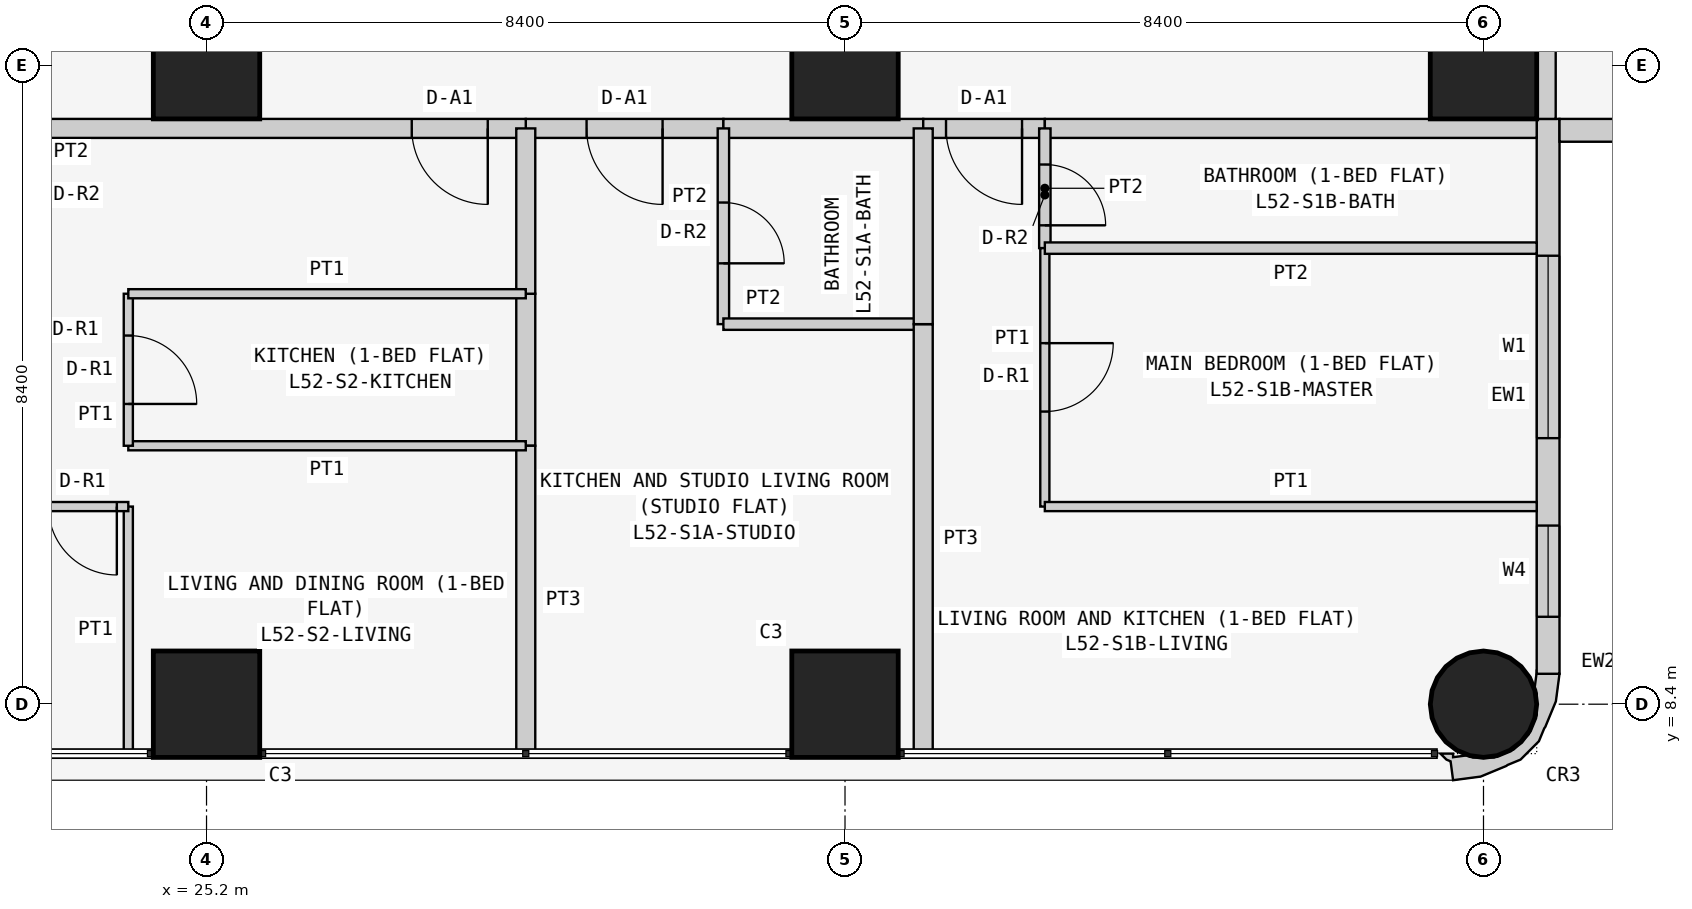
"""IFC4 building model, lengths in metres.
Left out: names, types, materials, properties, quantities, classifications, styles, units other than length and angle.
Written with IfcOpenShell. Run it as: python <this file> out.ifc"""

import sys

from ifc_helpers import new_model, si_unit, direction, frame, frame_2d, origin, origin_2d, place, context, subcontext, project, spatial, polyline, rectangle, circle, outline, extrude, element, fill, save


model = new_model("IFC4")
c1 = context("Model", 3, precision=1e-05, world=origin(), true_north=direction((0.0, 1.0)))
c2 = subcontext(c1, "Body", "Model", "MODEL_VIEW")
j1 = project(units=[si_unit("LENGTHUNIT", "METRE"), si_unit("PLANEANGLEUNIT", "RADIAN")], contexts=[c1])
p1 = place(None, origin())
s1 = spatial("IfcSite", under=j1, at=p1, CompositionType="ELEMENT")
p2 = place(p1, origin())
s2 = spatial("IfcBuilding", under=s1, at=p2, CompositionType="ELEMENT")
p3 = place(p2, frame((0.0, 0.0, 201.3)))
s3 = spatial("IfcBuildingStorey", under=s2, at=p3, CompositionType="ELEMENT", Elevation=201.3)
for number, where, z_axis, x_axis in (
    (1, (25.2, 8.4, 0.0), (0.0, 0.0, 1.0), (1.0, 0.0, 0.0)),
    (2, (25.2, 16.8, 0.0), (0.0, 0.0, 1.0), (1.0, 0.0, 0.0)),
    (3, (33.6, 8.4, 0.0), (0.0, 0.0, 1.0), (1.0, 0.0, 0.0)),
    (4, (33.6, 16.8, 0.0), (0.0, 0.0, 1.0), (1.0, 0.0, 0.0)),
):
    element("IfcColumn", number, at=place(p3, frame(where, z_axis=z_axis, x_axis=x_axis)), inside=s3, PredefinedType="COLUMN", context=c2, shape_type="SweptSolid", body=[
        extrude(rectangle(XDim=1.4, YDim=1.4, at=origin_2d()), origin(), (0.0, 0.0, 1.0), 3.6),
    ])
p4 = place(p3, frame((42.0, 8.4, 0.0), z_axis=(0.0, 0.0, 1.0), x_axis=(1.0, 0.0, 0.0)))
e5 = element("IfcColumn", 5, at=p4, inside=s3, PredefinedType="COLUMN", context=c2, shape_type="SweptSolid", body=[
    extrude(circle(Radius=0.7, at=origin_2d()), origin(), (0.0, 0.0, 1.0), 3.6),
])
p5 = place(p3, frame((42.0, 16.8, 0.0), z_axis=(0.0, 0.0, 1.0), x_axis=(1.0, 0.0, 0.0)))
e6 = element("IfcColumn", 6, at=p5, inside=s3, PredefinedType="COLUMN", context=c2, shape_type="SweptSolid", body=[
    extrude(rectangle(XDim=1.4, YDim=1.4, at=origin_2d()), origin(), (0.0, 0.0, 1.0), 3.6),
])
p6 = place(p3, frame((42.85, 8.8, 0.0), z_axis=(0.0, 0.0, 1.0), x_axis=(0.0, 1.0, 0.0)))
e7 = element("IfcWall", 7, at=p6, inside=s3, PredefinedType="SOLIDWALL", context=c2, shape_type="SweptSolid", body=[
    extrude(rectangle(XDim=7.3, YDim=0.3, at=frame_2d((3.65, 0.0))), origin(), (0.0, 0.0, 1.0), 3.45),
])
p7 = place(p6, frame((3.1, 0.0, 0.9)))
e8 = element("IfcOpeningElement", 8, at=p7, cuts=e7, PredefinedType="OPENING", context=c2, shape_type="SweptSolid", body=[
    extrude(rectangle(XDim=2.4, YDim=1.5, at=frame_2d((1.2, 0.75))), frame((0.0, 0.16, 0.0), z_axis=(0.0, -1.0, 0.0), x_axis=(1.0, 0.0, 0.0)), (0.0, 0.0, 1.0), 0.32),
])
p8 = place(p6, frame((0.75, 0.0, 0.9)))
e9 = element("IfcOpeningElement", 9, at=p8, cuts=e7, PredefinedType="OPENING", context=c2, shape_type="SweptSolid", body=[
    extrude(rectangle(XDim=1.2, YDim=1.5, at=frame_2d((0.6, 0.75))), frame((0.0, 0.16, 0.0), z_axis=(0.0, -1.0, 0.0), x_axis=(1.0, 0.0, 0.0)), (0.0, 0.0, 1.0), 0.32),
])
p9 = place(p3, frame((43.0, 15.95, 0.0), z_axis=(0.0, 0.0, 1.0), x_axis=(1.0, 0.0, 0.0)))
e10 = element("IfcWall", 10, at=p9, inside=s3, PredefinedType="SOLIDWALL", context=c2, shape_type="SweptSolid", body=[
    extrude(rectangle(XDim=7.0, YDim=0.3, at=frame_2d((3.5, 0.0))), origin(), (0.0, 0.0, 1.0), 3.45),
])
p10 = place(p9, frame((1.5, 0.0, 0.9)))
e11 = element("IfcOpeningElement", 11, at=p10, cuts=e10, PredefinedType="OPENING", context=c2, shape_type="SweptSolid", body=[
    extrude(rectangle(XDim=2.4, YDim=1.5, at=frame_2d((1.2, 0.75))), frame((0.0, 0.16, 0.0), z_axis=(0.0, -1.0, 0.0), x_axis=(1.0, 0.0, 0.0)), (0.0, 0.0, 1.0), 0.32),
])
p11 = place(p9, frame((5.05, 0.0, 0.9)))
e12 = element("IfcOpeningElement", 12, at=p11, cuts=e10, PredefinedType="OPENING", context=c2, shape_type="SweptSolid", body=[
    extrude(rectangle(XDim=1.2, YDim=1.5, at=frame_2d((0.6, 0.75))), frame((0.0, 0.16, 0.0), z_axis=(0.0, -1.0, 0.0), x_axis=(1.0, 0.0, 0.0)), (0.0, 0.0, 1.0), 0.32),
])
p12 = place(p3, frame((41.488, 7.812, 0.0), z_axis=(0.0, 0.0, 1.0), x_axis=(0.439933741929, -0.898030234854, 0.0)))
e13 = element("IfcWall", 13, at=p12, inside=s3, PredefinedType="SOLIDWALL", context=c2, shape_type="SweptSolid", body=[
    extrude(outline(polyline([(-0.222, 1.793), (-0.39, 1.541), (-0.372, 1.532), (-0.195, 1.414), (-0.12, 1.41), (0.131, 1.287), (0.315, 1.078), (0.406, 0.814), (0.388, 0.536), (0.265, 0.285), (0.209, 0.235), (0.148, 0.053), (0.105, 0.074), (0.032, -0.076), (0.138, -0.04), (0.182, -0.0), (0.419, -0.08), (0.536, 0.266), (0.559, 0.631), (0.555, 0.651), (0.566, 0.836), (0.455, 1.159), (0.333, 1.298), (0.324, 1.317), (0.082, 1.591), (-0.222, 1.793)])), origin(), (0.0, 0.0, 1.0), 3.45),
])
p13 = place(p3, frame((42.825, 22.971, 0.0), z_axis=(0.0, 0.0, 1.0), x_axis=(0.0, -1.0, 0.0)))
e14 = element("IfcWall", 14, at=p13, inside=s3, PredefinedType="PARTITIONING", context=c2, shape_type="SweptSolid", body=[
    extrude(rectangle(XDim=6.871, YDim=0.25, at=frame_2d((3.436, 0.0))), origin(), (0.0, 0.0, 1.0), 3.45),
])
p14 = place(p3, frame((32.0, 15.975, 0.0), z_axis=(0.0, 0.0, 1.0), x_axis=(-1.0, 0.0, 0.0)))
e15 = element("IfcWall", 15, at=p14, inside=s3, PredefinedType="PARTITIONING", context=c2, shape_type="SweptSolid", body=[
    extrude(rectangle(XDim=2.6, YDim=0.25, at=frame_2d((1.3, 0.0))), origin(), (0.0, 0.0, 1.0), 3.45),
])
p15 = place(p14, frame((0.8, 0.0, 0.0)))
e16 = element("IfcOpeningElement", 16, at=p15, cuts=e15, PredefinedType="OPENING", context=c2, shape_type="SweptSolid", body=[
    extrude(rectangle(XDim=1.0, YDim=2.1, at=frame_2d((0.5, 1.05))), frame((0.0, 0.135, 0.0), z_axis=(0.0, -1.0, 0.0), x_axis=(1.0, 0.0, 0.0)), (0.0, 0.0, 1.0), 0.27),
])
p16 = place(p3, frame((34.629, 15.975, 0.0), z_axis=(0.0, 0.0, 1.0), x_axis=(-1.0, 0.0, 0.0)))
e17 = element("IfcWall", 17, at=p16, inside=s3, PredefinedType="PARTITIONING", context=c2, shape_type="SweptSolid", body=[
    extrude(rectangle(XDim=2.629, YDim=0.25, at=frame_2d((1.314, 0.0))), origin(), (0.0, 0.0, 1.0), 3.45),
])
p17 = place(p3, frame((36.229, 15.975, 0.0), z_axis=(0.0, 0.0, 1.0), x_axis=(-1.0, 0.0, 0.0)))
e18 = element("IfcWall", 18, at=p17, inside=s3, PredefinedType="PARTITIONING", context=c2, shape_type="SweptSolid", body=[
    extrude(rectangle(XDim=1.6, YDim=0.25, at=frame_2d((0.8, 0.0))), origin(), (0.0, 0.0, 1.0), 3.45),
])
p18 = place(p17, frame((0.3, 0.0, 0.0)))
e19 = element("IfcOpeningElement", 19, at=p18, cuts=e18, PredefinedType="OPENING", context=c2, shape_type="SweptSolid", body=[
    extrude(rectangle(XDim=1.0, YDim=2.1, at=frame_2d((0.5, 1.05))), frame((0.0, 0.135, 0.0), z_axis=(0.0, -1.0, 0.0), x_axis=(1.0, 0.0, 0.0)), (0.0, 0.0, 1.0), 0.27),
])
p19 = place(p3, frame((42.7, 15.975, 0.0), z_axis=(0.0, 0.0, 1.0), x_axis=(-1.0, 0.0, 0.0)))
e20 = element("IfcWall", 20, at=p19, inside=s3, PredefinedType="PARTITIONING", context=c2, shape_type="SweptSolid", body=[
    extrude(rectangle(XDim=6.471, YDim=0.25, at=frame_2d((3.235, 0.0))), origin(), (0.0, 0.0, 1.0), 3.45),
])
p20 = place(p3, frame((29.4, 15.975, 0.0), z_axis=(0.0, 0.0, 1.0), x_axis=(-1.0, 0.0, 0.0)))
e21 = element("IfcWall", 21, at=p20, inside=s3, PredefinedType="PARTITIONING", context=c2, shape_type="SweptSolid", body=[
    extrude(rectangle(XDim=6.429, YDim=0.25, at=frame_2d((3.214, 0.0))), origin(), (0.0, 0.0, 1.0), 3.45),
])
p21 = place(p20, frame((0.5, 0.0, 0.0)))
e22 = element("IfcOpeningElement", 22, at=p21, cuts=e21, PredefinedType="OPENING", context=c2, shape_type="SweptSolid", body=[
    extrude(rectangle(XDim=1.0, YDim=2.1, at=frame_2d((0.5, 1.05))), frame((0.0, 0.135, 0.0), z_axis=(0.0, -1.0, 0.0), x_axis=(1.0, 0.0, 0.0)), (0.0, 0.0, 1.0), 0.27),
])
p22 = place(p3, frame((32.0, 15.975, 0.0), z_axis=(0.0, 0.0, 1.0), x_axis=(0.0, -1.0, 0.0)))
e23 = element("IfcWall", 23, at=p22, inside=s3, PredefinedType="PARTITIONING", context=c2, shape_type="SweptSolid", body=[
    extrude(rectangle(XDim=2.575, YDim=0.15, at=frame_2d((1.288, 0.0))), origin(), (0.0, 0.0, 1.0), 3.45),
])
p23 = place(p22, frame((0.975, 0.0, 0.0)))
e24 = element("IfcOpeningElement", 24, at=p23, cuts=e23, PredefinedType="OPENING", context=c2, shape_type="SweptSolid", body=[
    extrude(rectangle(XDim=0.8, YDim=2.1, at=frame_2d((0.4, 1.05))), frame((0.0, 0.085, 0.0), z_axis=(0.0, -1.0, 0.0), x_axis=(1.0, 0.0, 0.0)), (0.0, 0.0, 1.0), 0.17),
])
p24 = place(p3, frame((32.0, 13.4, 0.0), z_axis=(0.0, 0.0, 1.0), x_axis=(1.0, 0.0, 0.0)))
e25 = element("IfcWall", 25, at=p24, inside=s3, PredefinedType="PARTITIONING", context=c2, shape_type="SweptSolid", body=[
    extrude(rectangle(XDim=2.629, YDim=0.15, at=frame_2d((1.314, 0.0))), origin(), (0.0, 0.0, 1.0), 3.45),
])
p25 = place(p3, frame((34.629, 13.4, 0.0), z_axis=(0.0, 0.0, 1.0), x_axis=(0.0, -1.0, 0.0)))
e26 = element("IfcWall", 26, at=p25, inside=s3, PredefinedType="PARTITIONING", context=c2, shape_type="SweptSolid", body=[
    extrude(rectangle(XDim=5.65, YDim=0.25, at=frame_2d((2.825, 0.0))), origin(), (0.0, 0.0, 1.0), 3.45),
])
p26 = place(p3, frame((29.4, 11.8, 0.0), z_axis=(0.0, 0.0, 1.0), x_axis=(0.0, 1.0, 0.0)))
e27 = element("IfcWall", 27, at=p26, inside=s3, PredefinedType="PARTITIONING", context=c2, shape_type="SweptSolid", body=[
    extrude(rectangle(XDim=2.0, YDim=0.25, at=frame_2d((1.0, 0.0))), origin(), (0.0, 0.0, 1.0), 2.848),
])
p27 = place(p3, frame((29.4, 7.75, 0.0), z_axis=(0.0, 0.0, 1.0), x_axis=(0.0, 1.0, 0.0)))
e28 = element("IfcWall", 28, at=p27, inside=s3, PredefinedType="PARTITIONING", context=c2, shape_type="SweptSolid", body=[
    extrude(rectangle(XDim=4.05, YDim=0.25, at=frame_2d((2.025, 0.0))), origin(), (0.0, 0.0, 1.0), 2.848),
])
p28 = place(p3, frame((29.4, 13.8, 0.0), z_axis=(0.0, 0.0, 1.0), x_axis=(0.0, 1.0, 0.0)))
e29 = element("IfcWall", 29, at=p28, inside=s3, PredefinedType="PARTITIONING", context=c2, shape_type="SweptSolid", body=[
    extrude(rectangle(XDim=2.175, YDim=0.25, at=frame_2d((1.087, 0.0))), origin(), (0.0, 0.0, 1.0), 2.848),
])
p29 = place(p3, frame((34.629, 13.4, 0.0), z_axis=(0.0, 0.0, 1.0), x_axis=(0.0, 1.0, 0.0)))
e30 = element("IfcWall", 30, at=p29, inside=s3, PredefinedType="PARTITIONING", context=c2, shape_type="SweptSolid", body=[
    extrude(rectangle(XDim=2.575, YDim=0.25, at=frame_2d((1.288, 0.0))), origin(), (0.0, 0.0, 1.0), 3.45),
])
p30 = place(p3, frame((36.229, 15.975, 0.0), z_axis=(0.0, 0.0, 1.0), x_axis=(0.0, -1.0, 0.0)))
e31 = element("IfcWall", 31, at=p30, inside=s3, PredefinedType="PARTITIONING", context=c2, shape_type="SweptSolid", body=[
    extrude(rectangle(XDim=1.575, YDim=0.15, at=frame_2d((0.788, 0.0))), origin(), (0.0, 0.0, 1.0), 3.45),
])
p31 = place(p30, frame((0.475, 0.0, 0.0)))
e32 = element("IfcOpeningElement", 32, at=p31, cuts=e31, PredefinedType="OPENING", context=c2, shape_type="SweptSolid", body=[
    extrude(rectangle(XDim=0.8, YDim=2.1, at=frame_2d((0.4, 1.05))), frame((0.0, 0.085, 0.0), z_axis=(0.0, -1.0, 0.0), x_axis=(1.0, 0.0, 0.0)), (0.0, 0.0, 1.0), 0.17),
])
p32 = place(p3, frame((36.229, 14.4, 0.0), z_axis=(0.0, 0.0, 1.0), x_axis=(0.0, -1.0, 0.0)))
e33 = element("IfcWall", 33, at=p32, inside=s3, PredefinedType="PARTITIONING", context=c2, shape_type="SweptSolid", body=[
    extrude(rectangle(XDim=3.4, YDim=0.12, at=frame_2d((1.7, 0.0))), origin(), (0.0, 0.0, 1.0), 3.45),
])
p33 = place(p32, frame((1.25, 0.0, 0.0)))
e34 = element("IfcOpeningElement", 34, at=p33, cuts=e33, PredefinedType="OPENING", context=c2, shape_type="SweptSolid", body=[
    extrude(rectangle(XDim=0.9, YDim=2.1, at=frame_2d((0.45, 1.05))), frame((0.0, 0.07, 0.0), z_axis=(0.0, -1.0, 0.0), x_axis=(1.0, 0.0, 0.0)), (0.0, 0.0, 1.0), 0.14),
])
p34 = place(p3, frame((36.229, 11.0, 0.0), z_axis=(0.0, 0.0, 1.0), x_axis=(1.0, 0.0, 0.0)))
e35 = element("IfcWall", 35, at=p34, inside=s3, PredefinedType="PARTITIONING", context=c2, shape_type="SweptSolid", body=[
    extrude(rectangle(XDim=6.471, YDim=0.12, at=frame_2d((3.235, 0.0))), origin(), (0.0, 0.0, 1.0), 3.45),
])
p35 = place(p3, frame((36.229, 14.4, 0.0), z_axis=(0.0, 0.0, 1.0), x_axis=(1.0, 0.0, 0.0)))
e36 = element("IfcWall", 36, at=p35, inside=s3, PredefinedType="PARTITIONING", context=c2, shape_type="SweptSolid", body=[
    extrude(rectangle(XDim=6.471, YDim=0.15, at=frame_2d((3.235, 0.0))), origin(), (0.0, 0.0, 1.0), 3.45),
])
p36 = place(p3, frame((29.4, 11.8, 0.0), z_axis=(0.0, 0.0, 1.0), x_axis=(-1.0, 0.0, 0.0)))
e37 = element("IfcWall", 37, at=p36, inside=s3, PredefinedType="PARTITIONING", context=c2, shape_type="SweptSolid", body=[
    extrude(rectangle(XDim=5.229, YDim=0.12, at=frame_2d((2.615, 0.0))), origin(), (0.0, 0.0, 1.0), 3.45),
])
p37 = place(p3, frame((24.171, 11.8, 0.0), z_axis=(0.0, 0.0, 1.0), x_axis=(0.0, 1.0, 0.0)))
e38 = element("IfcWall", 38, at=p37, inside=s3, PredefinedType="PARTITIONING", context=c2, shape_type="SweptSolid", body=[
    extrude(rectangle(XDim=2.0, YDim=0.12, at=frame_2d((1.0, 0.0))), origin(), (0.0, 0.0, 1.0), 3.45),
])
p38 = place(p37, frame((0.55, 0.0, 0.0)))
e39 = element("IfcOpeningElement", 39, at=p38, cuts=e38, PredefinedType="OPENING", context=c2, shape_type="SweptSolid", body=[
    extrude(rectangle(XDim=0.9, YDim=2.1, at=frame_2d((0.45, 1.05))), frame((0.0, 0.07, 0.0), z_axis=(0.0, -1.0, 0.0), x_axis=(1.0, 0.0, 0.0)), (0.0, 0.0, 1.0), 0.14),
])
p39 = place(p3, frame((24.171, 13.8, 0.0), z_axis=(0.0, 0.0, 1.0), x_axis=(1.0, 0.0, 0.0)))
e40 = element("IfcWall", 40, at=p39, inside=s3, PredefinedType="PARTITIONING", context=c2, shape_type="SweptSolid", body=[
    extrude(rectangle(XDim=5.229, YDim=0.12, at=frame_2d((2.615, 0.0))), origin(), (0.0, 0.0, 1.0), 3.45),
])
p40 = place(p3, frame((24.171, 7.75, 0.0), z_axis=(0.0, 0.0, 1.0), x_axis=(0.0, 1.0, 0.0)))
e41 = element("IfcWall", 41, at=p40, inside=s3, PredefinedType="PARTITIONING", context=c2, shape_type="SweptSolid", body=[
    extrude(rectangle(XDim=3.25, YDim=0.12, at=frame_2d((1.625, 0.0))), origin(), (0.0, 0.0, 1.0), 3.45),
])
p41 = place(p3, frame((24.171, 11.0, 0.0), z_axis=(0.0, 0.0, 1.0), x_axis=(-1.0, 0.0, 0.0)))
e42 = element("IfcWall", 42, at=p41, inside=s3, PredefinedType="PARTITIONING", context=c2, shape_type="SweptSolid", body=[
    extrude(rectangle(XDim=1.2, YDim=0.12, at=frame_2d((0.6, 0.0))), origin(), (0.0, 0.0, 1.0), 3.45),
])
p42 = place(p41, frame((0.151, 0.0, 0.0)))
e43 = element("IfcOpeningElement", 43, at=p42, cuts=e42, PredefinedType="OPENING", context=c2, shape_type="SweptSolid", body=[
    extrude(rectangle(XDim=0.9, YDim=2.1, at=frame_2d((0.45, 1.05))), frame((0.0, 0.07, 0.0), z_axis=(0.0, -1.0, 0.0), x_axis=(1.0, 0.0, 0.0)), (0.0, 0.0, 1.0), 0.14),
])
p43 = place(p7, origin())
e44 = element("IfcWindow", 44, at=p43, inside=s3, PartitioningType="SINGLE_PANEL", PredefinedType="WINDOW", context=c2, shape_type="SweptSolid", body=[
    extrude(rectangle(XDim=2.4, YDim=1.5, at=frame_2d((1.2, 0.75))), frame((0.0, 0.03, 0.0), z_axis=(0.0, -1.0, 0.0), x_axis=(1.0, 0.0, 0.0)), (0.0, 0.0, 1.0), 0.06),
])
fill(e8, e44)
p44 = place(p8, origin())
e45 = element("IfcWindow", 45, at=p44, inside=s3, PartitioningType="SINGLE_PANEL", PredefinedType="WINDOW", context=c2, shape_type="SweptSolid", body=[
    extrude(rectangle(XDim=1.2, YDim=1.5, at=frame_2d((0.6, 0.75))), frame((0.0, 0.03, 0.0), z_axis=(0.0, -1.0, 0.0), x_axis=(1.0, 0.0, 0.0)), (0.0, 0.0, 1.0), 0.06),
])
fill(e9, e45)
p45 = place(p15, origin())
e46 = element("IfcDoor", 46, at=p45, inside=s3, OperationType="SINGLE_SWING_LEFT", PredefinedType="DOOR", context=c2, shape_type="SweptSolid", body=[
    extrude(rectangle(XDim=1.0, YDim=2.1, at=frame_2d((0.5, 1.05))), frame((0.0, 0.025, 0.0), z_axis=(0.0, -1.0, 0.0), x_axis=(1.0, 0.0, 0.0)), (0.0, 0.0, 1.0), 0.05),
])
fill(e16, e46)
p46 = place(p23, origin())
e47 = element("IfcDoor", 47, at=p46, inside=s3, OperationType="SINGLE_SWING_RIGHT", PredefinedType="DOOR", context=c2, shape_type="SweptSolid", body=[
    extrude(rectangle(XDim=0.8, YDim=2.1, at=frame_2d((0.4, 1.05))), frame((0.0, 0.025, 0.0), z_axis=(0.0, -1.0, 0.0), x_axis=(1.0, 0.0, 0.0)), (0.0, 0.0, 1.0), 0.05),
])
fill(e24, e47)
p47 = place(p18, origin())
e48 = element("IfcDoor", 48, at=p47, inside=s3, OperationType="SINGLE_SWING_LEFT", PredefinedType="DOOR", context=c2, shape_type="SweptSolid", body=[
    extrude(rectangle(XDim=1.0, YDim=2.1, at=frame_2d((0.5, 1.05))), frame((0.0, 0.025, 0.0), z_axis=(0.0, -1.0, 0.0), x_axis=(1.0, 0.0, 0.0)), (0.0, 0.0, 1.0), 0.05),
])
fill(e19, e48)
p48 = place(p31, origin())
e49 = element("IfcDoor", 49, at=p48, inside=s3, OperationType="SINGLE_SWING_RIGHT", PredefinedType="DOOR", context=c2, shape_type="SweptSolid", body=[
    extrude(rectangle(XDim=0.8, YDim=2.1, at=frame_2d((0.4, 1.05))), frame((0.0, 0.025, 0.0), z_axis=(0.0, -1.0, 0.0), x_axis=(1.0, 0.0, 0.0)), (0.0, 0.0, 1.0), 0.05),
])
fill(e32, e49)
p49 = place(p33, origin())
e50 = element("IfcDoor", 50, at=p49, inside=s3, OperationType="SINGLE_SWING_LEFT", PredefinedType="DOOR", context=c2, shape_type="SweptSolid", body=[
    extrude(rectangle(XDim=0.9, YDim=2.1, at=frame_2d((0.45, 1.05))), frame((0.0, 0.025, 0.0), z_axis=(0.0, -1.0, 0.0), x_axis=(1.0, 0.0, 0.0)), (0.0, 0.0, 1.0), 0.05),
])
fill(e34, e50)
p50 = place(p21, origin())
e51 = element("IfcDoor", 51, at=p50, inside=s3, OperationType="SINGLE_SWING_LEFT", PredefinedType="DOOR", context=c2, shape_type="SweptSolid", body=[
    extrude(rectangle(XDim=1.0, YDim=2.1, at=frame_2d((0.5, 1.05))), frame((0.0, 0.025, 0.0), z_axis=(0.0, -1.0, 0.0), x_axis=(1.0, 0.0, 0.0)), (0.0, 0.0, 1.0), 0.05),
])
fill(e22, e51)
p51 = place(p38, frame((0.9, 0.0, 0.0), z_axis=(0.0, 0.0, 1.0), x_axis=(-1.0, 0.0, 0.0)))
e52 = element("IfcDoor", 52, at=p51, inside=s3, OperationType="SINGLE_SWING_RIGHT", PredefinedType="DOOR", context=c2, shape_type="SweptSolid", body=[
    extrude(rectangle(XDim=0.9, YDim=2.1, at=frame_2d((0.45, 1.05))), frame((0.0, 0.025, 0.0), z_axis=(0.0, -1.0, 0.0), x_axis=(1.0, 0.0, 0.0)), (0.0, 0.0, 1.0), 0.05),
])
fill(e39, e52)
p52 = place(p42, origin())
e53 = element("IfcDoor", 53, at=p52, inside=s3, OperationType="SINGLE_SWING_LEFT", PredefinedType="DOOR", context=c2, shape_type="SweptSolid", body=[
    extrude(rectangle(XDim=0.9, YDim=2.1, at=frame_2d((0.45, 1.05))), frame((0.0, 0.025, 0.0), z_axis=(0.0, -1.0, 0.0), x_axis=(1.0, 0.0, 0.0)), (0.0, 0.0, 1.0), 0.05),
])
fill(e43, e53)
save(model, sys.argv[1])
